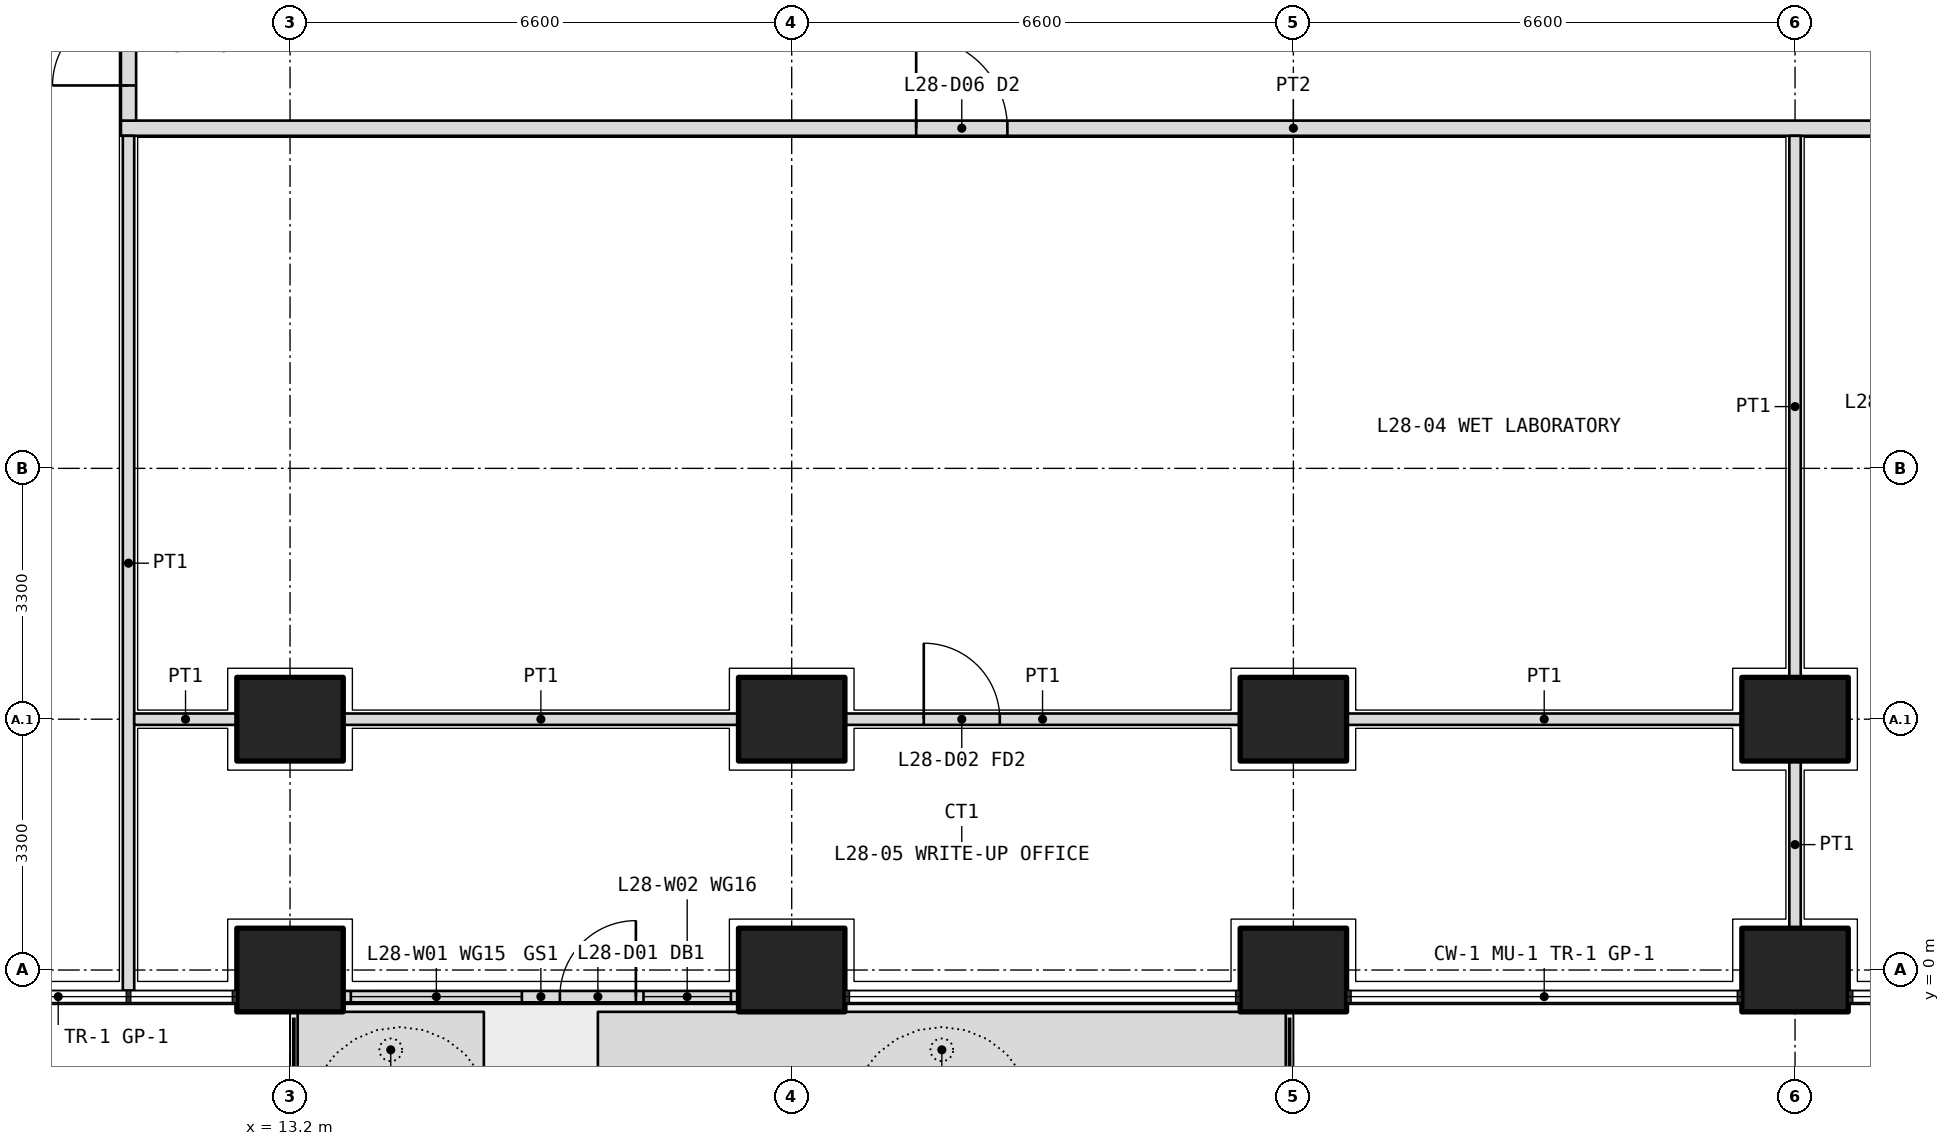
"""IFC4 building model, lengths in metres.
Left out: names, types, materials, properties, quantities, classifications, styles, units other than length and angle.
Written with IfcOpenShell. Run it as: python <this file> out.ifc"""

import sys

from ifc_helpers import new_model, si_unit, direction, frame, frame_2d, origin, origin_2d, place, context, subcontext, project, spatial, polyline, rectangle, outline, extrude, element, fill, save


model = new_model("IFC4")
c1 = context("Model", 3, precision=1e-05, world=origin(), true_north=direction((0.0, 1.0)))
c2 = subcontext(c1, "Body", "Model", "MODEL_VIEW")
j1 = project(units=[si_unit("LENGTHUNIT", "METRE"), si_unit("PLANEANGLEUNIT", "RADIAN")], contexts=[c1])
p1 = place(None, origin())
s1 = spatial("IfcSite", under=j1, at=p1, CompositionType="ELEMENT")
p2 = place(p1, origin())
s2 = spatial("IfcBuilding", under=s1, at=p2, CompositionType="ELEMENT")
p3 = place(p2, frame((0.0, 0.0, 124.2)))
s3 = spatial("IfcBuildingStorey", under=s2, at=p3, CompositionType="ELEMENT", Elevation=124.2)
for number, where, z_axis, x_axis in (
    (1, (13.2, 0.0, 0.0), (0.0, 0.0, 1.0), (1.0, 0.0, 0.0)),
    (2, (19.8, 0.0, 0.0), (0.0, 0.0, 1.0), (1.0, 0.0, 0.0)),
    (3, (26.4, 0.0, 0.0), (0.0, 0.0, 1.0), (1.0, 0.0, 0.0)),
    (4, (33.0, 0.0, 0.0), (0.0, 0.0, 1.0), (1.0, 0.0, 0.0)),
    (5, (13.2, 3.3, 0.0), (0.0, 0.0, 1.0), (1.0, 0.0, 0.0)),
    (6, (19.8, 3.3, 0.0), (0.0, 0.0, 1.0), (1.0, 0.0, 0.0)),
    (7, (26.4, 3.3, 0.0), (0.0, 0.0, 1.0), (1.0, 0.0, 0.0)),
    (8, (33.0, 3.3, 0.0), (0.0, 0.0, 1.0), (1.0, 0.0, 0.0)),
):
    element("IfcColumn", number, at=place(p3, frame(where, z_axis=z_axis, x_axis=x_axis)), inside=s3, PredefinedType="COLUMN", context=c2, shape_type="SweptSolid", body=[
        extrude(rectangle(XDim=1.4, YDim=1.1, at=origin_2d()), origin(), (0.0, 0.0, 1.0), 4.2),
    ])
p4 = place(p3, origin())
e9 = element("IfcWall", 9, at=p4, inside=s3, PredefinedType="USERDEFINED", context=c2, shape_type="SweptSolid", body=[
    extrude(outline(polyline([(13.3, -1.55), (15.75, -1.55), (15.75, -0.55), (13.3, -0.55), (13.3, -1.55)]), holes=[polyline([(13.45, -1.4), (15.6, -1.4), (15.6, -0.7), (13.45, -0.7), (13.45, -1.4)])]), origin(), (0.0, 0.0, 1.0), 1.05),
])
p5 = place(p3, origin())
e10 = element("IfcWall", 10, at=p5, inside=s3, PredefinedType="USERDEFINED", context=c2, shape_type="SweptSolid", body=[
    extrude(outline(polyline([(17.25, -1.55), (26.3, -1.55), (26.3, -0.55), (17.25, -0.55), (17.25, -1.55)]), holes=[polyline([(17.4, -1.4), (26.15, -1.4), (26.15, -0.7), (17.4, -0.7), (17.4, -1.4)])]), origin(), (0.0, 0.0, 1.0), 1.05),
])
p6 = place(p3, frame((13.9, -0.35, 0.0), z_axis=(0.0, 0.0, 1.0), x_axis=(1.0, 0.0, 0.0)))
e11 = element("IfcWall", 11, at=p6, inside=s3, PredefinedType="SOLIDWALL", context=c2, shape_type="SweptSolid", body=[
    extrude(rectangle(XDim=5.2, YDim=0.15, at=frame_2d((2.6, 0.0))), origin(), (0.0, 0.0, 1.0), 2.7),
])
p7 = place(p6, frame((2.85, 0.0, 0.0)))
e12 = element("IfcOpeningElement", 12, at=p7, cuts=e11, PredefinedType="OPENING", context=c2, shape_type="SweptSolid", body=[
    extrude(rectangle(XDim=1.0, YDim=2.4, at=frame_2d((0.5, 1.2))), frame((0.0, 0.085, 0.0), z_axis=(0.0, -1.0, 0.0), x_axis=(1.0, 0.0, 0.0)), (0.0, 0.0, 1.0), 0.17),
])
p8 = place(p6, frame((0.1, 0.0, 0.1)))
e13 = element("IfcOpeningElement", 13, at=p8, cuts=e11, PredefinedType="OPENING", context=c2, shape_type="SweptSolid", body=[
    extrude(rectangle(XDim=2.25, YDim=2.3, at=frame_2d((1.125, 1.15))), frame((0.0, 0.085, 0.0), z_axis=(0.0, -1.0, 0.0), x_axis=(1.0, 0.0, 0.0)), (0.0, 0.0, 1.0), 0.17),
])
p9 = place(p6, frame((3.95, 0.0, 0.1)))
e14 = element("IfcOpeningElement", 14, at=p9, cuts=e11, PredefinedType="OPENING", context=c2, shape_type="SweptSolid", body=[
    extrude(rectangle(XDim=1.15, YDim=2.3, at=frame_2d((0.575, 1.15))), frame((0.0, 0.085, 0.0), z_axis=(0.0, -1.0, 0.0), x_axis=(1.0, 0.0, 0.0)), (0.0, 0.0, 1.0), 0.17),
])
p10 = place(p3, frame((10.975, 11.075, 0.0), z_axis=(0.0, 0.0, 1.0), x_axis=(1.0, 0.0, 0.0)))
e15 = element("IfcWall", 15, at=p10, inside=s3, PredefinedType="PARTITIONING", context=c2, shape_type="SweptSolid", body=[
    extrude(rectangle(XDim=30.85, YDim=0.2, at=frame_2d((15.425, 0.0))), origin(), (0.0, 0.0, 1.0), 2.85),
])
p11 = place(p10, frame((10.462, 0.0, 0.0)))
e16 = element("IfcOpeningElement", 16, at=p11, cuts=e15, PredefinedType="OPENING", context=c2, shape_type="SweptSolid", body=[
    extrude(rectangle(XDim=1.2, YDim=2.1, at=frame_2d((0.6, 1.05))), frame((0.0, 0.11, 0.0), z_axis=(0.0, -1.0, 0.0), x_axis=(1.0, 0.0, 0.0)), (0.0, 0.0, 1.0), 0.22),
])
p12 = place(p10, frame((23.625, 0.0, 0.0)))
e17 = element("IfcOpeningElement", 17, at=p12, cuts=e15, PredefinedType="OPENING", context=c2, shape_type="SweptSolid", body=[
    extrude(rectangle(XDim=1.0, YDim=2.1, at=frame_2d((0.5, 1.05))), frame((0.0, 0.11, 0.0), z_axis=(0.0, -1.0, 0.0), x_axis=(1.0, 0.0, 0.0)), (0.0, 0.0, 1.0), 0.22),
])
p13 = place(p10, frame((26.925, 0.0, 0.0)))
e18 = element("IfcOpeningElement", 18, at=p13, cuts=e15, PredefinedType="OPENING", context=c2, shape_type="SweptSolid", body=[
    extrude(rectangle(XDim=1.0, YDim=2.1, at=frame_2d((0.5, 1.05))), frame((0.0, 0.11, 0.0), z_axis=(0.0, -1.0, 0.0), x_axis=(1.0, 0.0, 0.0)), (0.0, 0.0, 1.0), 0.22),
])
p14 = place(p10, frame((29.087, 0.0, 0.0)))
e19 = element("IfcOpeningElement", 19, at=p14, cuts=e15, PredefinedType="OPENING", context=c2, shape_type="SweptSolid", body=[
    extrude(rectangle(XDim=1.2, YDim=2.1, at=frame_2d((0.6, 1.05))), frame((0.0, 0.11, 0.0), z_axis=(0.0, -1.0, 0.0), x_axis=(1.0, 0.0, 0.0)), (0.0, 0.0, 1.0), 0.22),
])
p15 = place(p3, frame((11.075, 11.175, 0.0), z_axis=(0.0, 0.0, 1.0), x_axis=(0.0, 1.0, 0.0)))
e20 = element("IfcWall", 20, at=p15, inside=s3, PredefinedType="PARTITIONING", context=c2, shape_type="SweptSolid", body=[
    extrude(rectangle(XDim=27.625, YDim=0.2, at=frame_2d((13.812, 0.0))), origin(), (0.0, 0.0, 1.0), 2.85),
])
p16 = place(p15, frame((0.462, 0.0, 0.0)))
e21 = element("IfcOpeningElement", 21, at=p16, cuts=e20, PredefinedType="OPENING", context=c2, shape_type="SweptSolid", body=[
    extrude(rectangle(XDim=1.0, YDim=2.1, at=frame_2d((0.5, 1.05))), frame((0.0, 0.11, 0.0), z_axis=(0.0, -1.0, 0.0), x_axis=(1.0, 0.0, 0.0)), (0.0, 0.0, 1.0), 0.22),
])
p17 = place(p15, frame((2.575, 0.0, 0.0)))
e22 = element("IfcOpeningElement", 22, at=p17, cuts=e20, PredefinedType="OPENING", context=c2, shape_type="SweptSolid", body=[
    extrude(rectangle(XDim=1.0, YDim=2.1, at=frame_2d((0.5, 1.05))), frame((0.0, 0.11, 0.0), z_axis=(0.0, -1.0, 0.0), x_axis=(1.0, 0.0, 0.0)), (0.0, 0.0, 1.0), 0.22),
])
p18 = place(p15, frame((5.625, 0.0, 0.0)))
e23 = element("IfcOpeningElement", 23, at=p18, cuts=e20, PredefinedType="OPENING", context=c2, shape_type="SweptSolid", body=[
    extrude(rectangle(XDim=0.9, YDim=2.1, at=frame_2d((0.45, 1.05))), frame((0.0, 0.11, 0.0), z_axis=(0.0, -1.0, 0.0), x_axis=(1.0, 0.0, 0.0)), (0.0, 0.0, 1.0), 0.22),
])
p19 = place(p15, frame((9.425, 0.0, 0.0)))
e24 = element("IfcOpeningElement", 24, at=p19, cuts=e20, PredefinedType="OPENING", context=c2, shape_type="SweptSolid", body=[
    extrude(rectangle(XDim=0.9, YDim=2.1, at=frame_2d((0.45, 1.05))), frame((0.0, 0.11, 0.0), z_axis=(0.0, -1.0, 0.0), x_axis=(1.0, 0.0, 0.0)), (0.0, 0.0, 1.0), 0.22),
])
p20 = place(p15, frame((12.975, 0.0, 0.0)))
e25 = element("IfcOpeningElement", 25, at=p20, cuts=e20, PredefinedType="OPENING", context=c2, shape_type="SweptSolid", body=[
    extrude(rectangle(XDim=1.0, YDim=2.1, at=frame_2d((0.5, 1.05))), frame((0.0, 0.11, 0.0), z_axis=(0.0, -1.0, 0.0), x_axis=(1.0, 0.0, 0.0)), (0.0, 0.0, 1.0), 0.22),
])
p21 = place(p15, frame((20.975, 0.0, 0.0)))
e26 = element("IfcOpeningElement", 26, at=p21, cuts=e20, PredefinedType="OPENING", context=c2, shape_type="SweptSolid", body=[
    extrude(rectangle(XDim=1.0, YDim=2.1, at=frame_2d((0.5, 1.05))), frame((0.0, 0.11, 0.0), z_axis=(0.0, -1.0, 0.0), x_axis=(1.0, 0.0, 0.0)), (0.0, 0.0, 1.0), 0.22),
])
p22 = place(p3, frame((11.075, -0.27, 0.0), z_axis=(0.0, 0.0, 1.0), x_axis=(0.0, 1.0, 0.0)))
e27 = element("IfcWall", 27, at=p22, inside=s3, PredefinedType="PARTITIONING", context=c2, shape_type="SweptSolid", body=[
    extrude(rectangle(XDim=11.245, YDim=0.15, at=frame_2d((5.623, 0.0))), origin(), (0.0, 0.0, 1.0), 2.7),
])
p23 = place(p3, frame((11.15, 3.3, 0.0), z_axis=(0.0, 0.0, 1.0), x_axis=(1.0, 0.0, 0.0)))
e28 = element("IfcWall", 28, at=p23, inside=s3, PredefinedType="PARTITIONING", context=c2, shape_type="SweptSolid", body=[
    extrude(rectangle(XDim=1.35, YDim=0.15, at=frame_2d((0.675, 0.0))), origin(), (0.0, 0.0, 1.0), 2.85),
])
p24 = place(p3, frame((13.9, 3.3, 0.0), z_axis=(0.0, 0.0, 1.0), x_axis=(1.0, 0.0, 0.0)))
e29 = element("IfcWall", 29, at=p24, inside=s3, PredefinedType="PARTITIONING", context=c2, shape_type="SweptSolid", body=[
    extrude(rectangle(XDim=5.2, YDim=0.15, at=frame_2d((2.6, 0.0))), origin(), (0.0, 0.0, 1.0), 2.85),
])
p25 = place(p3, frame((20.5, 3.3, 0.0), z_axis=(0.0, 0.0, 1.0), x_axis=(1.0, 0.0, 0.0)))
e30 = element("IfcWall", 30, at=p25, inside=s3, PredefinedType="PARTITIONING", context=c2, shape_type="SweptSolid", body=[
    extrude(rectangle(XDim=5.2, YDim=0.15, at=frame_2d((2.6, 0.0))), origin(), (0.0, 0.0, 1.0), 2.85),
])
p26 = place(p25, frame((1.038, 0.0, 0.0)))
e31 = element("IfcOpeningElement", 31, at=p26, cuts=e30, PredefinedType="OPENING", context=c2, shape_type="SweptSolid", body=[
    extrude(rectangle(XDim=1.0, YDim=2.1, at=frame_2d((0.5, 1.05))), frame((0.0, 0.085, 0.0), z_axis=(0.0, -1.0, 0.0), x_axis=(1.0, 0.0, 0.0)), (0.0, 0.0, 1.0), 0.17),
])
p27 = place(p3, frame((27.1, 3.3, 0.0), z_axis=(0.0, 0.0, 1.0), x_axis=(1.0, 0.0, 0.0)))
e32 = element("IfcWall", 32, at=p27, inside=s3, PredefinedType="PARTITIONING", context=c2, shape_type="SweptSolid", body=[
    extrude(rectangle(XDim=5.2, YDim=0.15, at=frame_2d((2.6, 0.0))), origin(), (0.0, 0.0, 1.0), 2.85),
])
p28 = place(p3, frame((33.0, 0.55, 0.0), z_axis=(0.0, 0.0, 1.0), x_axis=(0.0, 1.0, 0.0)))
e33 = element("IfcWall", 33, at=p28, inside=s3, PredefinedType="PARTITIONING", context=c2, shape_type="SweptSolid", body=[
    extrude(rectangle(XDim=2.2, YDim=0.15, at=frame_2d((1.1, 0.0))), origin(), (0.0, 0.0, 1.0), 2.85),
])
p29 = place(p3, frame((33.0, 3.85, 0.0), z_axis=(0.0, 0.0, 1.0), x_axis=(0.0, 1.0, 0.0)))
e34 = element("IfcWall", 34, at=p29, inside=s3, PredefinedType="PARTITIONING", context=c2, shape_type="SweptSolid", body=[
    extrude(rectangle(XDim=7.125, YDim=0.15, at=frame_2d((3.562, 0.0))), origin(), (0.0, 0.0, 1.0), 2.85),
])
p30 = place(p7, origin())
e35 = element("IfcDoor", 35, at=p30, inside=s3, OperationType="SINGLE_SWING_RIGHT", PredefinedType="DOOR", context=c2, shape_type="SweptSolid", body=[
    extrude(rectangle(XDim=1.0, YDim=2.4, at=frame_2d((0.5, 1.2))), frame((0.0, 0.025, 0.0), z_axis=(0.0, -1.0, 0.0), x_axis=(1.0, 0.0, 0.0)), (0.0, 0.0, 1.0), 0.05),
])
fill(e12, e35)
p31 = place(p8, origin())
e36 = element("IfcWindow", 36, at=p31, inside=s3, PartitioningType="SINGLE_PANEL", PredefinedType="WINDOW", context=c2, shape_type="SweptSolid", body=[
    extrude(rectangle(XDim=2.25, YDim=2.3, at=frame_2d((1.125, 1.15))), frame((0.0, 0.03, 0.0), z_axis=(0.0, -1.0, 0.0), x_axis=(1.0, 0.0, 0.0)), (0.0, 0.0, 1.0), 0.06),
])
fill(e13, e36)
p32 = place(p9, origin())
e37 = element("IfcWindow", 37, at=p32, inside=s3, PartitioningType="SINGLE_PANEL", PredefinedType="WINDOW", context=c2, shape_type="SweptSolid", body=[
    extrude(rectangle(XDim=1.15, YDim=2.3, at=frame_2d((0.575, 1.15))), frame((0.0, 0.03, 0.0), z_axis=(0.0, -1.0, 0.0), x_axis=(1.0, 0.0, 0.0)), (0.0, 0.0, 1.0), 0.06),
])
fill(e14, e37)
p33 = place(p11, origin())
e38 = element("IfcDoor", 38, at=p33, inside=s3, OperationType="DOUBLE_DOOR_SINGLE_SWING", PredefinedType="DOOR", context=c2, shape_type="SweptSolid", body=[
    extrude(rectangle(XDim=1.2, YDim=2.1, at=frame_2d((0.6, 1.05))), frame((0.0, 0.025, 0.0), z_axis=(0.0, -1.0, 0.0), x_axis=(1.0, 0.0, 0.0)), (0.0, 0.0, 1.0), 0.05),
])
fill(e16, e38)
p34 = place(p26, origin())
e39 = element("IfcDoor", 39, at=p34, inside=s3, OperationType="SINGLE_SWING_LEFT", PredefinedType="DOOR", context=c2, shape_type="SweptSolid", body=[
    extrude(rectangle(XDim=1.0, YDim=2.1, at=frame_2d((0.5, 1.05))), frame((0.0, 0.025, 0.0), z_axis=(0.0, -1.0, 0.0), x_axis=(1.0, 0.0, 0.0)), (0.0, 0.0, 1.0), 0.05),
])
fill(e31, e39)
p35 = place(p16, origin())
e40 = element("IfcDoor", 40, at=p35, inside=s3, OperationType="SINGLE_SWING_LEFT", PredefinedType="DOOR", context=c2, shape_type="SweptSolid", body=[
    extrude(rectangle(XDim=1.0, YDim=2.1, at=frame_2d((0.5, 1.05))), frame((0.0, 0.025, 0.0), z_axis=(0.0, -1.0, 0.0), x_axis=(1.0, 0.0, 0.0)), (0.0, 0.0, 1.0), 0.05),
])
fill(e21, e40)
save(model, sys.argv[1])
